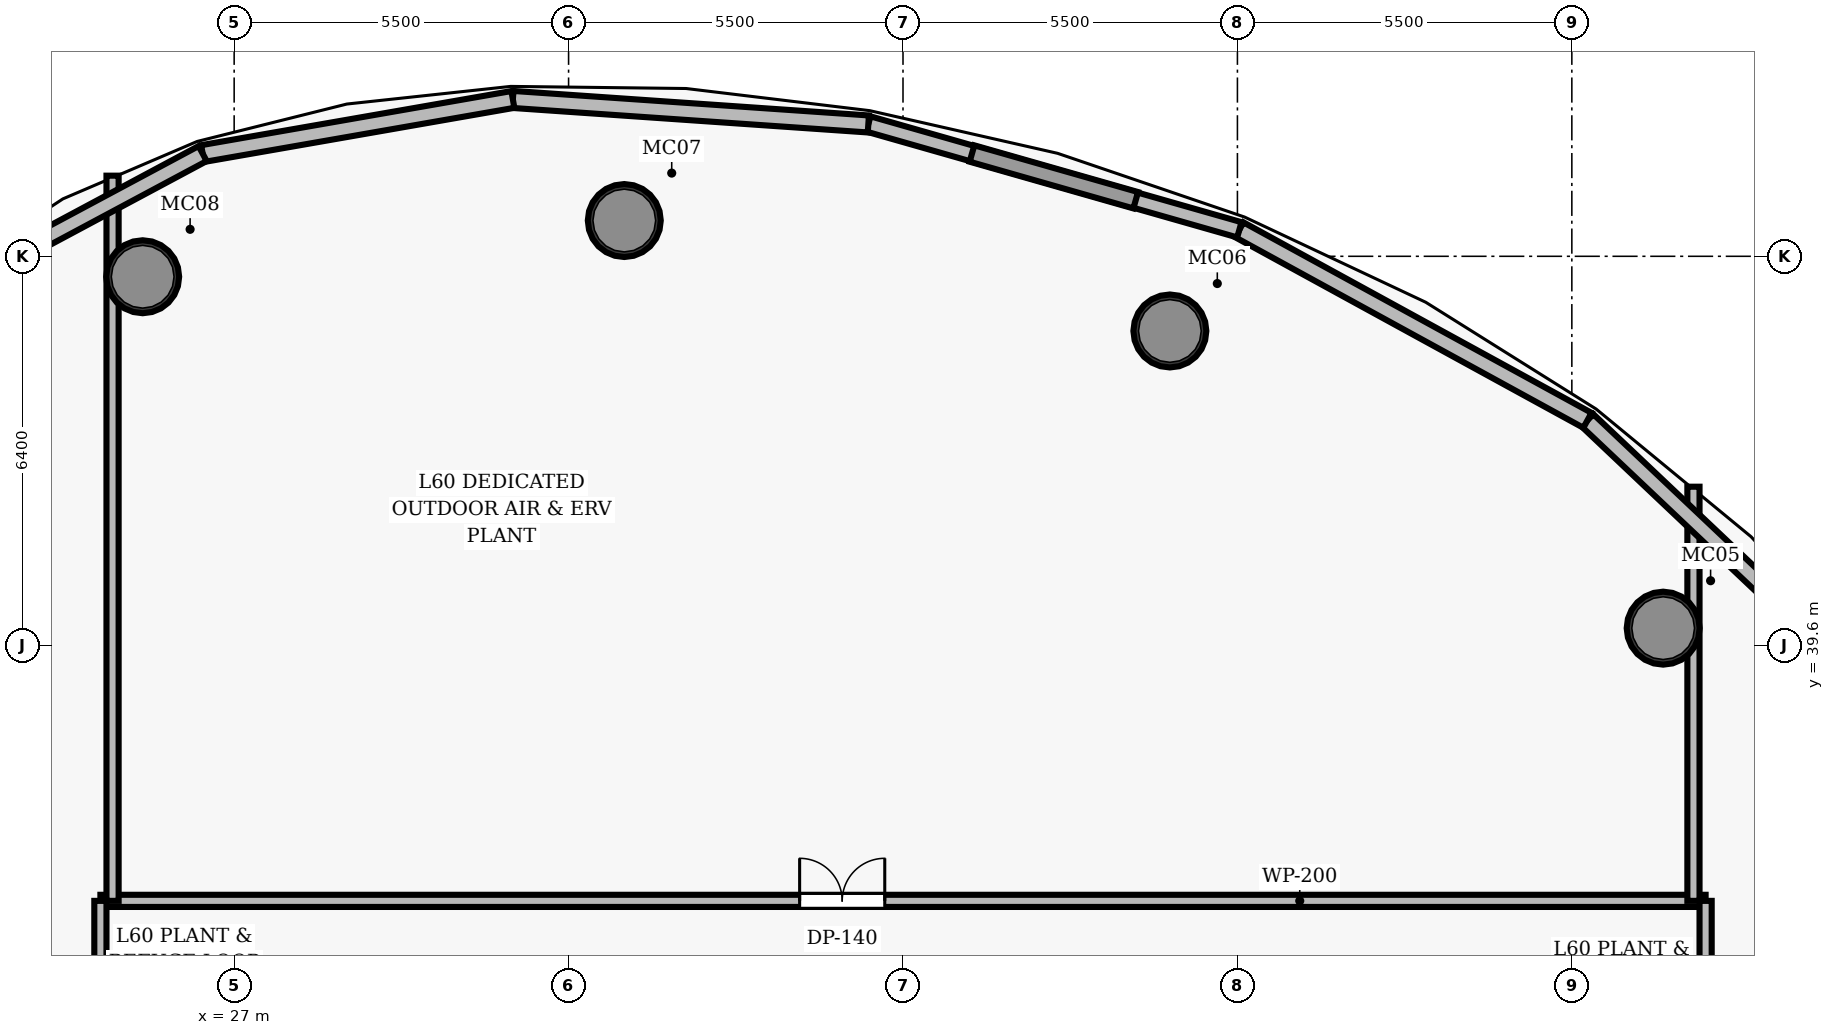
"""IFC4 building model, lengths in metres.
Left out: names, types, materials, properties, quantities, classifications, styles, units other than length and angle.
Written with IfcOpenShell. Run it as: python <this file> out.ifc"""

import sys

from ifc_helpers import new_model, si_unit, direction, frame, frame_2d, origin, origin_2d, place, context, subcontext, project, spatial, rectangle, hollow_circle, extrude, element, fill, save


model = new_model("IFC4")
c1 = context("Model", 3, precision=1e-05, world=origin(), true_north=direction((0.0, 1.0)))
c2 = subcontext(c1, "Body", "Model", "MODEL_VIEW")
j1 = project(units=[si_unit("LENGTHUNIT", "METRE"), si_unit("PLANEANGLEUNIT", "RADIAN")], contexts=[c1])
p1 = place(None, origin())
s1 = spatial("IfcSite", under=j1, at=p1, CompositionType="ELEMENT")
p2 = place(p1, origin())
s2 = spatial("IfcBuilding", under=s1, at=p2, CompositionType="ELEMENT")
p3 = place(p2, frame((0.0, 0.0, 236.65)))
s3 = spatial("IfcBuildingStorey", under=s2, at=p3, CompositionType="ELEMENT", Elevation=236.65)
for number, where, z_axis, x_axis in (
    (1, (50.502, 39.885, 0.0), (0.0, 0.0, 1.0), (1.0, 0.0, 0.0)),
    (2, (42.389, 44.772, 0.0), (0.0, 0.0, 1.0), (1.0, 0.0, 0.0)),
    (3, (33.416, 46.588, 0.0), (0.0, 0.0, 1.0), (1.0, 0.0, 0.0)),
    (4, (25.496, 45.664, 0.0), (0.0, 0.0, 1.0), (1.0, 0.0, 0.0)),
):
    element("IfcColumn", number, at=place(p3, frame(where, z_axis=z_axis, x_axis=x_axis)), inside=s3, PredefinedType="COLUMN", context=c2, shape_type="SweptSolid", body=[
        extrude(hollow_circle(Radius=0.6, WallThickness=0.05, at=origin_2d()), origin(), (0.0, 0.0, 1.0), 5.4),
    ])
p4 = place(p3, frame((24.8, 35.4, 0.0), z_axis=(0.0, 0.0, 1.0), x_axis=(1.0, 0.0, 0.0)))
e5 = element("IfcWall", 5, at=p4, inside=s3, PredefinedType="PARTITIONING", context=c2, shape_type="SweptSolid", body=[
    extrude(rectangle(XDim=26.4, YDim=0.2, at=frame_2d((13.2, 0.0))), origin(), (0.0, 0.0, 1.0), 4.04),
])
p5 = place(p4, frame((11.5, 0.0, 0.0)))
e6 = element("IfcOpeningElement", 6, at=p5, cuts=e5, PredefinedType="OPENING", context=c2, shape_type="SweptSolid", body=[
    extrude(rectangle(XDim=1.4, YDim=2.25, at=frame_2d((0.7, 1.125))), frame((0.0, 0.11, 0.0), z_axis=(0.0, -1.0, 0.0), x_axis=(1.0, 0.0, 0.0)), (0.0, 0.0, 1.0), 0.22),
])
p6 = place(p3, frame((24.8, 16.6, 0.0), z_axis=(0.0, 0.0, 1.0), x_axis=(0.0, 1.0, 0.0)))
e7 = element("IfcWall", 7, at=p6, inside=s3, PredefinedType="PARTITIONING", context=c2, shape_type="SweptSolid", body=[
    extrude(rectangle(XDim=18.8, YDim=0.2, at=frame_2d((9.4, 0.0))), origin(), (0.0, 0.0, 1.0), 4.04),
])
p7 = place(p6, frame((8.2, 0.0, 0.0)))
e8 = element("IfcOpeningElement", 8, at=p7, cuts=e7, PredefinedType="OPENING", context=c2, shape_type="SweptSolid", body=[
    extrude(rectangle(XDim=1.4, YDim=2.25, at=frame_2d((0.7, 1.125))), frame((0.0, 0.11, 0.0), z_axis=(0.0, -1.0, 0.0), x_axis=(1.0, 0.0, 0.0)), (0.0, 0.0, 1.0), 0.22),
])
p8 = place(p3, frame((51.2, 16.6, 0.0), z_axis=(0.0, 0.0, 1.0), x_axis=(0.0, 1.0, 0.0)))
e9 = element("IfcWall", 9, at=p8, inside=s3, PredefinedType="PARTITIONING", context=c2, shape_type="SweptSolid", body=[
    extrude(rectangle(XDim=18.8, YDim=0.2, at=frame_2d((9.4, 0.0))), origin(), (0.0, 0.0, 1.0), 4.04),
])
p9 = place(p8, frame((8.2, 0.0, 0.0)))
e10 = element("IfcOpeningElement", 10, at=p9, cuts=e9, PredefinedType="OPENING", context=c2, shape_type="SweptSolid", body=[
    extrude(rectangle(XDim=1.4, YDim=2.25, at=frame_2d((0.7, 1.125))), frame((0.0, 0.11, 0.0), z_axis=(0.0, -1.0, 0.0), x_axis=(1.0, 0.0, 0.0)), (0.0, 0.0, 1.0), 0.22),
])
p10 = place(p3, frame((25.0, 35.4, 0.0), z_axis=(0.0, 0.0, 1.0), x_axis=(0.0, 1.0, 0.0)))
e11 = element("IfcWall", 11, at=p10, inside=s3, PredefinedType="PARTITIONING", context=c2, shape_type="SweptSolid", body=[
    extrude(rectangle(XDim=11.926, YDim=0.2, at=frame_2d((5.963, 0.0))), origin(), (0.0, 0.0, 1.0), 4.04),
])
p11 = place(p3, frame((51.0, 35.4, 0.0), z_axis=(0.0, 0.0, 1.0), x_axis=(0.0, 1.0, 0.0)))
e12 = element("IfcWall", 12, at=p11, inside=s3, PredefinedType="PARTITIONING", context=c2, shape_type="SweptSolid", body=[
    extrude(rectangle(XDim=6.811, YDim=0.2, at=frame_2d((3.406, 0.0))), origin(), (0.0, 0.0, 1.0), 4.04),
])
p12 = place(p3, frame((49.257, 43.302, 0.0), z_axis=(0.0, 0.0, 1.0), x_axis=(0.726362423444, -0.687311886852, 0.0)))
e13 = element("IfcWall", 13, at=p12, inside=s3, PredefinedType="SOLIDWALL", context=c2, shape_type="SweptSolid", body=[
    extrude(rectangle(XDim=6.527, YDim=0.28, at=frame_2d((3.264, 0.0))), origin(), (0.0, 0.0, 1.0), 4.98),
])
p13 = place(p3, frame((43.532, 46.436, 0.0), z_axis=(0.0, 0.0, 1.0), x_axis=(0.877199815451, -0.480125487526, 0.0)))
e14 = element("IfcWall", 14, at=p13, inside=s3, PredefinedType="SOLIDWALL", context=c2, shape_type="SweptSolid", body=[
    extrude(rectangle(XDim=6.526, YDim=0.28, at=frame_2d((3.263, 0.0))), origin(), (0.0, 0.0, 1.0), 4.98),
])
p14 = place(p3, frame((37.43, 48.177, 0.0), z_axis=(0.0, 0.0, 1.0), x_axis=(0.961634216747, -0.274334892386, 0.0)))
e15 = element("IfcWall", 15, at=p14, inside=s3, PredefinedType="SOLIDWALL", context=c2, shape_type="SweptSolid", body=[
    extrude(rectangle(XDim=6.345, YDim=0.26, at=frame_2d((3.173, 0.0))), origin(), (0.0, 0.0, 1.0), 4.98),
])
p15 = place(p3, frame((31.584, 48.58, 0.0), z_axis=(0.0, 0.0, 1.0), x_axis=(0.997631610149, -0.068783504066, 0.0)))
e16 = element("IfcWall", 16, at=p15, inside=s3, PredefinedType="SOLIDWALL", context=c2, shape_type="SweptSolid", body=[
    extrude(rectangle(XDim=5.86, YDim=0.28, at=frame_2d((2.93, 0.0))), origin(), (0.0, 0.0, 1.0), 4.98),
])
p16 = place(p3, frame((26.482, 47.689, 0.0), z_axis=(0.0, 0.0, 1.0), x_axis=(0.985120975094, 0.171862341509, 0.0)))
e17 = element("IfcWall", 17, at=p16, inside=s3, PredefinedType="SOLIDWALL", context=c2, shape_type="SweptSolid", body=[
    extrude(rectangle(XDim=5.179, YDim=0.28, at=frame_2d((2.59, 0.0))), origin(), (0.0, 0.0, 1.0), 4.98),
])
p17 = place(p3, frame((22.381, 45.495, 0.0), z_axis=(0.0, 0.0, 1.0), x_axis=(0.88168357973, 0.471841144067, 0.0)))
e18 = element("IfcWall", 18, at=p17, inside=s3, PredefinedType="SOLIDWALL", context=c2, shape_type="SweptSolid", body=[
    extrude(rectangle(XDim=4.651, YDim=0.28, at=frame_2d((2.325, 0.0))), origin(), (0.0, 0.0, 1.0), 4.98),
])
p18 = place(p5, origin())
e19 = element("IfcDoor", 19, at=p18, inside=s3, OperationType="DOUBLE_DOOR_SINGLE_SWING", PredefinedType="DOOR", context=c2, shape_type="SweptSolid", body=[
    extrude(rectangle(XDim=1.4, YDim=2.25, at=frame_2d((0.7, 1.125))), frame((0.0, 0.025, 0.0), z_axis=(0.0, -1.0, 0.0), x_axis=(1.0, 0.0, 0.0)), (0.0, 0.0, 1.0), 0.05),
])
fill(e6, e19)
save(model, sys.argv[1])
